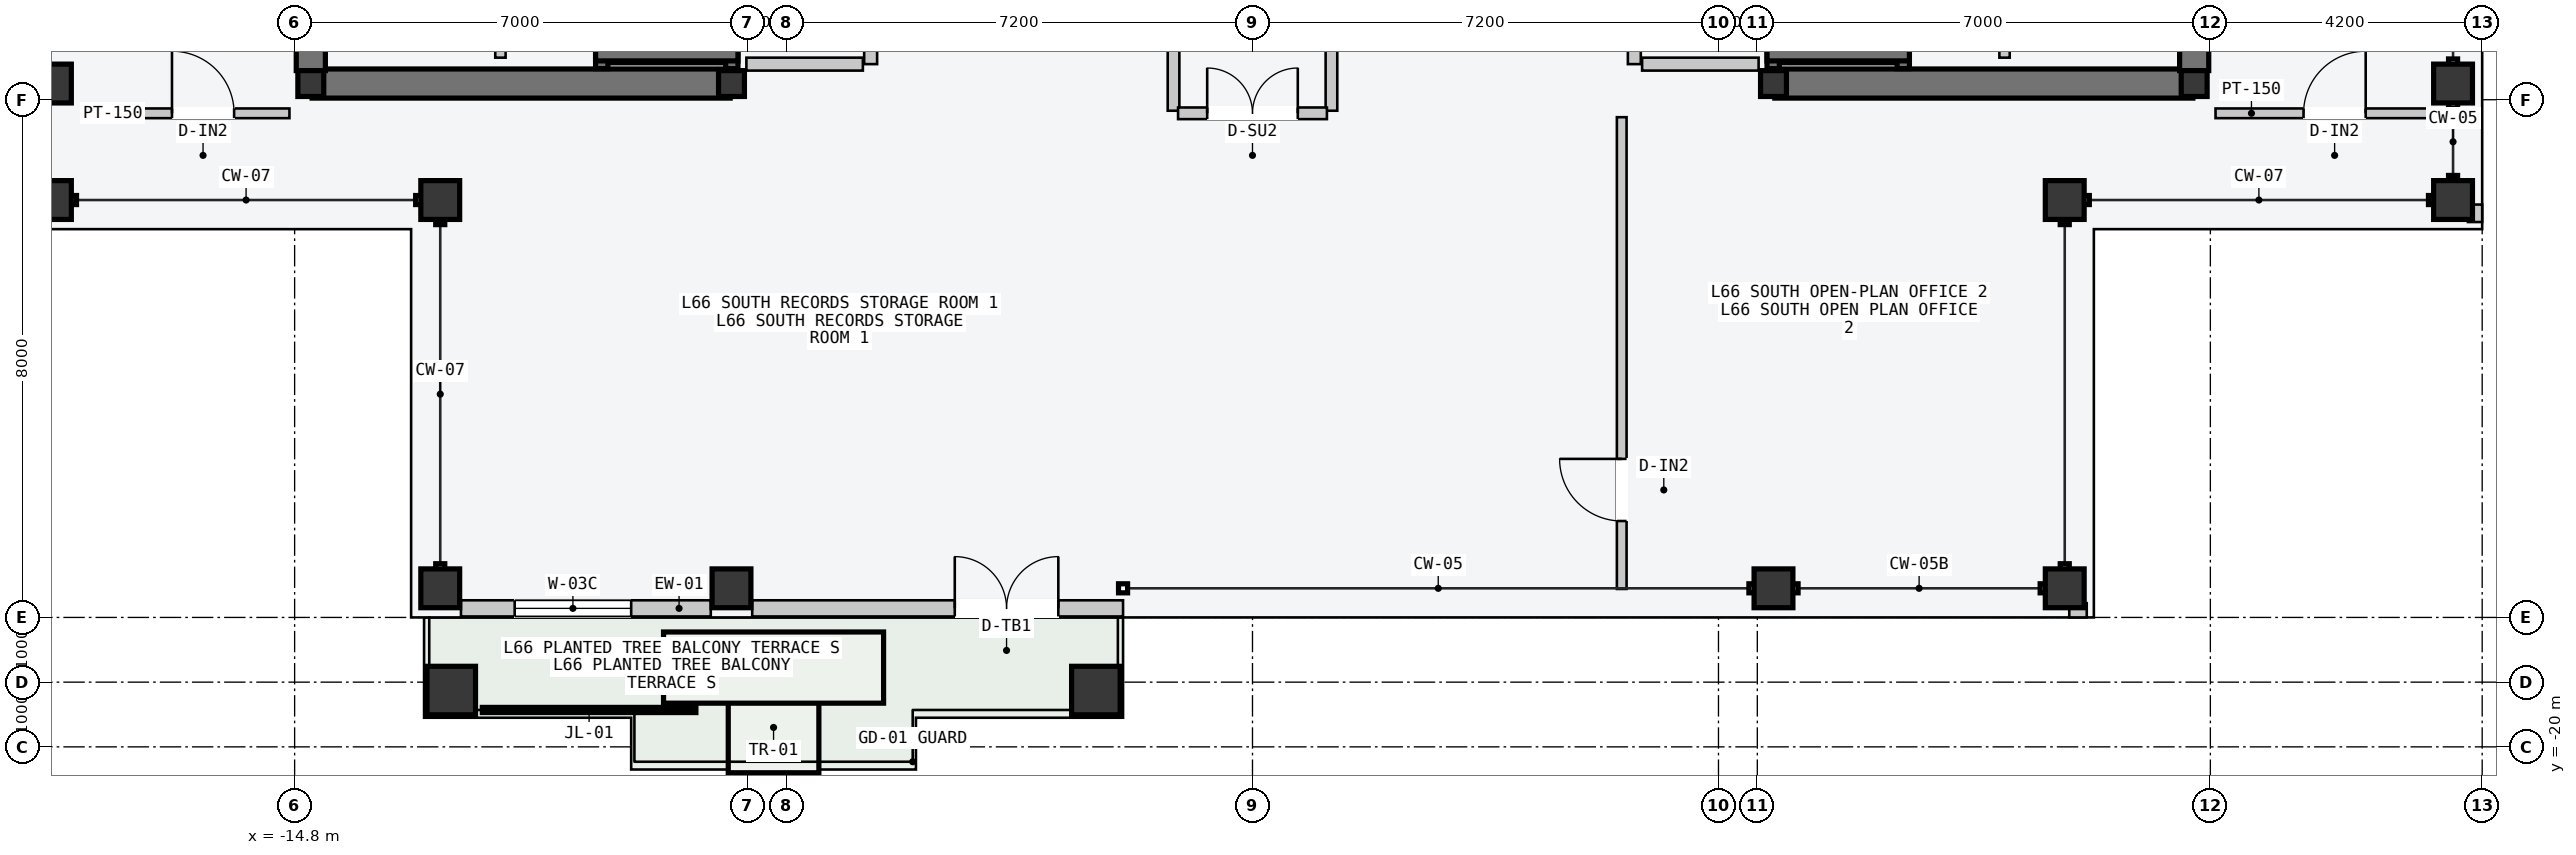
"""IFC4 building model, lengths in metres.
Left out: names, types, materials, properties, quantities, classifications, styles, units other than length and angle.
Written with IfcOpenShell. Run it as: python <this file> out.ifc"""

import sys

from ifc_helpers import new_model, si_unit, direction, frame, frame_2d, origin, origin_2d, place, context, subcontext, project, spatial, rectangle, hollow_rectangle, i_section, extrude, element, fill, save


model = new_model("IFC4")
c1 = context("Model", 3, precision=1e-05, world=origin(), true_north=direction((0.0, 1.0)))
c2 = subcontext(c1, "Body", "Model", "MODEL_VIEW")
j1 = project(units=[si_unit("LENGTHUNIT", "METRE"), si_unit("PLANEANGLEUNIT", "RADIAN")], contexts=[c1])
p1 = place(None, origin())
s1 = spatial("IfcSite", under=j1, at=p1, CompositionType="ELEMENT")
p2 = place(p1, origin())
s2 = spatial("IfcBuilding", under=s1, at=p2, CompositionType="ELEMENT")
p3 = place(p2, frame((0.0, 0.0, 250.8)))
s3 = spatial("IfcBuildingStorey", under=s2, at=p3, CompositionType="ELEMENT", Elevation=250.8)
p4 = place(p3, frame((-14.53, -9.75, -0.2), z_axis=(0.0, 0.0, 1.0), x_axis=(1.0, 0.0, 0.0)))
e1 = element("IfcWall", 1, at=p4, inside=s3, PredefinedType="SHEAR", context=c2, shape_type="SweptSolid", body=[
    extrude(rectangle(XDim=6.46, YDim=0.45, at=frame_2d((3.23, 0.0))), origin(), (0.0, 0.0, 1.0), 3.6),
])
p5 = place(p3, frame((-14.55, -9.55, -0.2), z_axis=(0.0, 0.0, 1.0), x_axis=(0.0, 1.0, 0.0)))
e2 = element("IfcWall", 2, at=p5, inside=s3, PredefinedType="SHEAR", context=c2, shape_type="SweptSolid", body=[
    extrude(rectangle(XDim=9.35, YDim=0.45, at=frame_2d((4.675, 0.0))), origin(), (0.0, 0.0, 1.0), 3.6),
])
p6 = place(p3, frame((8.07, -9.75, -0.2), z_axis=(0.0, 0.0, 1.0), x_axis=(1.0, 0.0, 0.0)))
e3 = element("IfcWall", 3, at=p6, inside=s3, PredefinedType="SHEAR", context=c2, shape_type="SweptSolid", body=[
    extrude(rectangle(XDim=6.46, YDim=0.45, at=frame_2d((3.23, 0.0))), origin(), (0.0, 0.0, 1.0), 3.6),
])
p7 = place(p3, frame((14.55, -9.55, -0.2), z_axis=(0.0, 0.0, 1.0), x_axis=(0.0, 1.0, 0.0)))
e4 = element("IfcWall", 4, at=p7, inside=s3, PredefinedType="SHEAR", context=c2, shape_type="SweptSolid", body=[
    extrude(rectangle(XDim=9.35, YDim=0.45, at=frame_2d((4.675, 0.0))), origin(), (0.0, 0.0, 1.0), 3.6),
])
for number, where, z_axis, x_axis in (
    (5, (-14.55, -9.75, 0.0), (0.0, 0.0, 1.0), (1.0, 0.0, 0.0)),
    (6, (-8.05, -9.75, 0.0), (0.0, 0.0, 1.0), (1.0, 0.0, 0.0)),
    (7, (8.05, -9.75, 0.0), (0.0, 0.0, 1.0), (1.0, 0.0, 0.0)),
    (8, (14.55, -9.75, 0.0), (0.0, 0.0, 1.0), (1.0, 0.0, 0.0)),
):
    element("IfcColumn", number, at=place(p3, frame(where, z_axis=z_axis, x_axis=x_axis)), inside=s3, PredefinedType="COLUMN", context=c2, shape_type="SweptSolid", body=[
        extrude(i_section(OverallWidth=0.4, OverallDepth=0.4, WebThickness=0.013, FlangeThickness=0.021, at=origin_2d()), origin(), (0.0, 0.0, 1.0), 3.6),
    ])
for number, where, z_axis, x_axis in (
    (9, (-12.55, -17.55, 0.0), (0.0, 0.0, 1.0), (1.0, 0.0, 0.0)),
    (10, (-8.05, -17.55, 0.0), (0.0, 0.0, 1.0), (1.0, 0.0, 0.0)),
    (11, (8.05, -17.55, 0.0), (0.0, 0.0, 1.0), (1.0, 0.0, 0.0)),
    (12, (12.55, -17.55, 0.0), (0.0, 0.0, 1.0), (1.0, 0.0, 0.0)),
    (13, (-18.55, -11.55, 0.0), (0.0, 0.0, 1.0), (0.0, 1.0, 0.0)),
    (14, (-18.55, -9.75, 0.0), (0.0, 0.0, 1.0), (0.0, 1.0, 0.0)),
    (15, (18.55, -11.55, 0.0), (0.0, 0.0, 1.0), (0.0, 1.0, 0.0)),
    (16, (18.55, -9.75, 0.0), (0.0, 0.0, 1.0), (0.0, 1.0, 0.0)),
    (17, (12.55, -11.55, 0.0), (0.0, 0.0, 1.0), (1.0, 0.0, 0.0)),
    (18, (-12.55, -11.55, 0.0), (0.0, 0.0, 1.0), (1.0, 0.0, 0.0)),
):
    element("IfcColumn", number, at=place(p3, frame(where, z_axis=z_axis, x_axis=x_axis)), inside=s3, PredefinedType="COLUMN", context=c2, shape_type="SweptSolid", body=[
        extrude(hollow_rectangle(XDim=0.6, YDim=0.6, WallThickness=0.025, at=origin_2d()), origin(), (0.0, 0.0, 1.0), 3.6),
    ])
for number, where, z_axis, x_axis in (
    (19, (-12.38, -19.13, 0.0), (0.0, 0.0, 1.0), (1.0, 0.0, 0.0)),
    (20, (-2.42, -19.13, 0.0), (0.0, 0.0, 1.0), (1.0, 0.0, 0.0)),
):
    element("IfcColumn", number, at=place(p3, frame(where, z_axis=z_axis, x_axis=x_axis)), inside=s3, PredefinedType="COLUMN", context=c2, shape_type="SweptSolid", body=[
        extrude(hollow_rectangle(XDim=0.75, YDim=0.75, WallThickness=0.032, at=origin_2d()), origin(), (0.0, 0.0, 1.0), 3.6),
    ])
p8 = place(p3, frame((-12.23, -17.86, 0.0), z_axis=(0.0, 0.0, 1.0), x_axis=(1.0, 0.0, 0.0)))
e21 = element("IfcWall", 21, at=p8, inside=s3, PredefinedType="STANDARD", context=c2, shape_type="SweptSolid", body=[
    extrude(rectangle(XDim=3.86, YDim=0.25, at=frame_2d((1.93, 0.0))), origin(), (0.0, 0.0, 1.0), 3.4),
])
p9 = place(p8, frame((0.83, 0.0, 0.85)))
e22 = element("IfcOpeningElement", 22, at=p9, cuts=e21, PredefinedType="OPENING", context=c2, shape_type="SweptSolid", body=[
    extrude(rectangle(XDim=1.8, YDim=2.05, at=frame_2d((0.9, 1.025))), frame((0.0, 0.135, 0.0), z_axis=(0.0, -1.0, 0.0), x_axis=(1.0, 0.0, 0.0)), (0.0, 0.0, 1.0), 0.27),
])
p10 = place(p3, frame((-7.73, -17.86, 0.0), z_axis=(0.0, 0.0, 1.0), x_axis=(1.0, 0.0, 0.0)))
e23 = element("IfcWall", 23, at=p10, inside=s3, PredefinedType="STANDARD", context=c2, shape_type="SweptSolid", body=[
    extrude(rectangle(XDim=5.73, YDim=0.25, at=frame_2d((2.865, 0.0))), origin(), (0.0, 0.0, 1.0), 3.4),
])
p11 = place(p10, frame((3.13, 0.0, 0.0)))
e24 = element("IfcOpeningElement", 24, at=p11, cuts=e23, PredefinedType="OPENING", context=c2, shape_type="SweptSolid", body=[
    extrude(rectangle(XDim=1.6, YDim=2.2, at=frame_2d((0.8, 1.1))), frame((0.0, 0.135, 0.0), z_axis=(0.0, -1.0, 0.0), x_axis=(1.0, 0.0, 0.0)), (0.0, 0.0, 1.0), 0.27),
])
for number, where, z_axis, x_axis in (
    (25, (12.62, -17.89, 0.0), (0.0, 0.0, 1.0), (1.0, 0.0, 0.0)),
    (26, (18.89, -11.89, 0.0), (0.0, 0.0, 1.0), (0.0, 1.0, 0.0)),
):
    element("IfcWall", number, at=place(p3, frame(where, z_axis=z_axis, x_axis=x_axis)), inside=s3, PredefinedType="PARAPET", context=c2, shape_type="SweptSolid", body=[
        extrude(rectangle(XDim=0.27, YDim=0.22, at=frame_2d((0.135, 0.0))), origin(), (0.0, 0.0, 1.0), 1.2),
    ])
p12 = place(p3, frame((-8.045, -9.52, -0.2), z_axis=(0.0, 0.0, 1.0), x_axis=(0.0, 1.0, 0.0)))
e27 = element("IfcWall", 27, at=p12, inside=s3, PredefinedType="SOLIDWALL", context=c2, shape_type="SweptSolid", body=[
    extrude(rectangle(XDim=2.12, YDim=0.19, at=frame_2d((1.06, 0.0))), origin(), (0.0, 0.0, 1.0), 3.6),
])
p13 = place(p12, frame((0.57, 0.0, 0.2)))
e28 = element("IfcOpeningElement", 28, at=p13, cuts=e27, PredefinedType="OPENING", context=c2, shape_type="SweptSolid", body=[
    extrude(rectangle(XDim=1.1, YDim=2.2, at=frame_2d((0.55, 1.1))), frame((0.0, 0.105, 0.0), z_axis=(0.0, -1.0, 0.0), x_axis=(1.0, 0.0, 0.0)), (0.0, 0.0, 1.0), 0.21),
])
p14 = place(p3, frame((-10.055, -9.52, -0.2), z_axis=(0.0, 0.0, 1.0), x_axis=(0.0, 1.0, 0.0)))
e29 = element("IfcWall", 29, at=p14, inside=s3, PredefinedType="SOLIDWALL", context=c2, shape_type="SweptSolid", body=[
    extrude(rectangle(XDim=2.12, YDim=0.19, at=frame_2d((1.06, 0.0))), origin(), (0.0, 0.0, 1.0), 3.6),
])
p15 = place(p3, frame((-10.15, -9.305, -0.2), z_axis=(0.0, 0.0, 1.0), x_axis=(1.0, 0.0, 0.0)))
e30 = element("IfcWall", 30, at=p15, inside=s3, PredefinedType="SOLIDWALL", context=c2, shape_type="SweptSolid", body=[
    extrude(rectangle(XDim=2.2, YDim=0.19, at=frame_2d((1.1, 0.0))), origin(), (0.0, 0.0, 1.0), 3.6),
])
p16 = place(p3, frame((8.045, -9.52, -0.2), z_axis=(0.0, 0.0, 1.0), x_axis=(0.0, 1.0, 0.0)))
e31 = element("IfcWall", 31, at=p16, inside=s3, PredefinedType="SOLIDWALL", context=c2, shape_type="SweptSolid", body=[
    extrude(rectangle(XDim=2.12, YDim=0.19, at=frame_2d((1.06, 0.0))), origin(), (0.0, 0.0, 1.0), 3.6),
])
p17 = place(p16, frame((0.57, 0.0, 0.2)))
e32 = element("IfcOpeningElement", 32, at=p17, cuts=e31, PredefinedType="OPENING", context=c2, shape_type="SweptSolid", body=[
    extrude(rectangle(XDim=1.1, YDim=2.2, at=frame_2d((0.55, 1.1))), frame((0.0, 0.105, 0.0), z_axis=(0.0, -1.0, 0.0), x_axis=(1.0, 0.0, 0.0)), (0.0, 0.0, 1.0), 0.21),
])
p18 = place(p3, frame((10.055, -9.52, -0.2), z_axis=(0.0, 0.0, 1.0), x_axis=(0.0, 1.0, 0.0)))
e33 = element("IfcWall", 33, at=p18, inside=s3, PredefinedType="SOLIDWALL", context=c2, shape_type="SweptSolid", body=[
    extrude(rectangle(XDim=2.12, YDim=0.19, at=frame_2d((1.06, 0.0))), origin(), (0.0, 0.0, 1.0), 3.6),
])
p19 = place(p3, frame((7.95, -9.305, -0.2), z_axis=(0.0, 0.0, 1.0), x_axis=(1.0, 0.0, 0.0)))
e34 = element("IfcWall", 34, at=p19, inside=s3, PredefinedType="SOLIDWALL", context=c2, shape_type="SweptSolid", body=[
    extrude(rectangle(XDim=2.2, YDim=0.19, at=frame_2d((1.1, 0.0))), origin(), (0.0, 0.0, 1.0), 3.6),
])
p20 = place(p3, frame((-5.9, -9.45, 0.0), z_axis=(0.0, 0.0, 1.0), x_axis=(0.0, 1.0, 0.0)))
e35 = element("IfcWall", 35, at=p20, inside=s3, PredefinedType="PARTITIONING", context=c2, shape_type="SweptSolid", body=[
    extrude(rectangle(XDim=10.5, YDim=0.2, at=frame_2d((5.25, 0.0))), origin(), (0.0, 0.0, 1.0), 3.4),
])
p21 = place(p20, frame((3.9, 0.0, 0.0)))
e36 = element("IfcOpeningElement", 36, at=p21, cuts=e35, PredefinedType="OPENING", context=c2, shape_type="SweptSolid", body=[
    extrude(rectangle(XDim=1.5, YDim=2.2, at=frame_2d((0.75, 1.1))), frame((0.0, 0.11, 0.0), z_axis=(0.0, -1.0, 0.0), x_axis=(1.0, 0.0, 0.0)), (0.0, 0.0, 1.0), 0.22),
])
p22 = place(p3, frame((-6.02, -9.45, 0.0), z_axis=(0.0, 0.0, 1.0), x_axis=(-1.0, 0.0, 0.0)))
e37 = element("IfcWall", 37, at=p22, inside=s3, PredefinedType="PARTITIONING", context=c2, shape_type="SweptSolid", body=[
    extrude(rectangle(XDim=1.8, YDim=0.2, at=frame_2d((0.9, 0.0))), origin(), (0.0, 0.0, 1.0), 3.4),
])
p23 = place(p3, frame((-11.62, -9.35, 0.0), z_axis=(0.0, 0.0, 1.0), x_axis=(0.0, 1.0, 0.0)))
e38 = element("IfcWall", 38, at=p23, inside=s3, PredefinedType="PARTITIONING", context=c2, shape_type="SweptSolid", body=[
    extrude(rectangle(XDim=3.85, YDim=0.16, at=frame_2d((1.925, 0.0))), origin(), (0.0, 0.0, 1.0), 3.4),
])
p24 = place(p23, frame((1.475, 0.0, 0.0)))
e39 = element("IfcOpeningElement", 39, at=p24, cuts=e38, PredefinedType="OPENING", context=c2, shape_type="SweptSolid", body=[
    extrude(rectangle(XDim=0.9, YDim=2.15, at=frame_2d((0.45, 1.075))), frame((0.0, 0.09, 0.0), z_axis=(0.0, -1.0, 0.0), x_axis=(1.0, 0.0, 0.0)), (0.0, 0.0, 1.0), 0.18),
])
p25 = place(p3, frame((5.9, -9.45, 0.0), z_axis=(0.0, 0.0, 1.0), x_axis=(0.0, 1.0, 0.0)))
e40 = element("IfcWall", 40, at=p25, inside=s3, PredefinedType="PARTITIONING", context=c2, shape_type="SweptSolid", body=[
    extrude(rectangle(XDim=10.5, YDim=0.2, at=frame_2d((5.25, 0.0))), origin(), (0.0, 0.0, 1.0), 3.4),
])
p26 = place(p25, frame((3.9, 0.0, 0.0)))
e41 = element("IfcOpeningElement", 41, at=p26, cuts=e40, PredefinedType="OPENING", context=c2, shape_type="SweptSolid", body=[
    extrude(rectangle(XDim=1.5, YDim=2.2, at=frame_2d((0.75, 1.1))), frame((0.0, 0.11, 0.0), z_axis=(0.0, -1.0, 0.0), x_axis=(1.0, 0.0, 0.0)), (0.0, 0.0, 1.0), 0.22),
])
p27 = place(p3, frame((6.02, -9.45, 0.0), z_axis=(0.0, 0.0, 1.0), x_axis=(1.0, 0.0, 0.0)))
e42 = element("IfcWall", 42, at=p27, inside=s3, PredefinedType="PARTITIONING", context=c2, shape_type="SweptSolid", body=[
    extrude(rectangle(XDim=1.8, YDim=0.2, at=frame_2d((0.9, 0.0))), origin(), (0.0, 0.0, 1.0), 3.4),
])
p28 = place(p3, frame((11.62, -9.35, 0.0), z_axis=(0.0, 0.0, 1.0), x_axis=(0.0, 1.0, 0.0)))
e43 = element("IfcWall", 43, at=p28, inside=s3, PredefinedType="PARTITIONING", context=c2, shape_type="SweptSolid", body=[
    extrude(rectangle(XDim=3.85, YDim=0.16, at=frame_2d((1.925, 0.0))), origin(), (0.0, 0.0, 1.0), 3.4),
])
p29 = place(p28, frame((1.475, 0.0, 0.0)))
e44 = element("IfcOpeningElement", 44, at=p29, cuts=e43, PredefinedType="OPENING", context=c2, shape_type="SweptSolid", body=[
    extrude(rectangle(XDim=0.9, YDim=2.15, at=frame_2d((0.45, 1.075))), frame((0.0, 0.09, 0.0), z_axis=(0.0, -1.0, 0.0), x_axis=(1.0, 0.0, 0.0)), (0.0, 0.0, 1.0), 0.18),
])
p30 = place(p3, frame((-1.22, -10.17, 0.0), z_axis=(0.0, 0.0, 1.0), x_axis=(0.0, 1.0, 0.0)))
e45 = element("IfcWall", 45, at=p30, inside=s3, PredefinedType="PARTITIONING", context=c2, shape_type="SweptSolid", body=[
    extrude(rectangle(XDim=4.49, YDim=0.18, at=frame_2d((2.245, 0.0))), origin(), (0.0, 0.0, 1.0), 3.4),
])
p31 = place(p30, frame((1.15, 0.0, 0.0)))
e46 = element("IfcOpeningElement", 46, at=p31, cuts=e45, PredefinedType="OPENING", context=c2, shape_type="SweptSolid", body=[
    extrude(rectangle(XDim=0.96, YDim=2.18, at=frame_2d((0.48, 1.09))), frame((0.0, 0.1, 0.0), z_axis=(0.0, -1.0, 0.0), x_axis=(1.0, 0.0, 0.0)), (0.0, 0.0, 1.0), 0.2),
])
p32 = place(p3, frame((1.22, -10.17, 0.0), z_axis=(0.0, 0.0, 1.0), x_axis=(0.0, 1.0, 0.0)))
e47 = element("IfcWall", 47, at=p32, inside=s3, PredefinedType="PARTITIONING", context=c2, shape_type="SweptSolid", body=[
    extrude(rectangle(XDim=4.49, YDim=0.18, at=frame_2d((2.245, 0.0))), origin(), (0.0, 0.0, 1.0), 3.4),
])
p33 = place(p32, frame((1.15, 0.0, 0.0)))
e48 = element("IfcOpeningElement", 48, at=p33, cuts=e47, PredefinedType="OPENING", context=c2, shape_type="SweptSolid", body=[
    extrude(rectangle(XDim=0.96, YDim=2.18, at=frame_2d((0.48, 1.09))), frame((0.0, 0.1, 0.0), z_axis=(0.0, -1.0, 0.0), x_axis=(1.0, 0.0, 0.0)), (0.0, 0.0, 1.0), 0.2),
])
p34 = place(p3, frame((5.705, -17.56, 0.0), z_axis=(0.0, 0.0, 1.0), x_axis=(0.0, 1.0, 0.0)))
e49 = element("IfcWall", 49, at=p34, inside=s3, PredefinedType="PARTITIONING", context=c2, shape_type="SweptSolid", body=[
    extrude(rectangle(XDim=7.29, YDim=0.15, at=frame_2d((3.645, 0.0))), origin(), (0.0, 0.0, 1.0), 3.4),
])
p35 = place(p34, frame((1.05, 0.0, 0.0)))
e50 = element("IfcOpeningElement", 50, at=p35, cuts=e49, PredefinedType="OPENING", context=c2, shape_type="SweptSolid", body=[
    extrude(rectangle(XDim=0.96, YDim=2.18, at=frame_2d((0.48, 1.09))), frame((0.0, 0.085, 0.0), z_axis=(0.0, -1.0, 0.0), x_axis=(1.0, 0.0, 0.0)), (0.0, 0.0, 1.0), 0.17),
])
p36 = place(p3, frame((-1.15, -10.21, 0.0), z_axis=(0.0, 0.0, 1.0), x_axis=(1.0, 0.0, 0.0)))
e51 = element("IfcWall", 51, at=p36, inside=s3, PredefinedType="PARTITIONING", context=c2, shape_type="SweptSolid", body=[
    extrude(rectangle(XDim=2.3, YDim=0.18, at=frame_2d((1.15, 0.0))), origin(), (0.0, 0.0, 1.0), 3.4),
])
p37 = place(p36, frame((0.45, 0.0, 0.0)))
e52 = element("IfcOpeningElement", 52, at=p37, cuts=e51, PredefinedType="OPENING", context=c2, shape_type="SweptSolid", body=[
    extrude(rectangle(XDim=1.4, YDim=2.2, at=frame_2d((0.7, 1.1))), frame((0.0, 0.1, 0.0), z_axis=(0.0, -1.0, 0.0), x_axis=(1.0, 0.0, 0.0)), (0.0, 0.0, 1.0), 0.2),
])
p38 = place(p3, frame((-17.55, -10.21, 0.0), z_axis=(0.0, 0.0, 1.0), x_axis=(1.0, 0.0, 0.0)))
e53 = element("IfcWall", 53, at=p38, inside=s3, PredefinedType="PARTITIONING", context=c2, shape_type="SweptSolid", body=[
    extrude(rectangle(XDim=2.67, YDim=0.15, at=frame_2d((1.335, 0.0))), origin(), (0.0, 0.0, 1.0), 3.4),
])
p39 = place(p38, frame((0.855, 0.0, 0.0)))
e54 = element("IfcOpeningElement", 54, at=p39, cuts=e53, PredefinedType="OPENING", context=c2, shape_type="SweptSolid", body=[
    extrude(rectangle(XDim=0.96, YDim=2.18, at=frame_2d((0.48, 1.09))), frame((0.0, 0.085, 0.0), z_axis=(0.0, -1.0, 0.0), x_axis=(1.0, 0.0, 0.0)), (0.0, 0.0, 1.0), 0.17),
])
p40 = place(p3, frame((14.88, -10.21, 0.0), z_axis=(0.0, 0.0, 1.0), x_axis=(1.0, 0.0, 0.0)))
e55 = element("IfcWall", 55, at=p40, inside=s3, PredefinedType="PARTITIONING", context=c2, shape_type="SweptSolid", body=[
    extrude(rectangle(XDim=3.68, YDim=0.15, at=frame_2d((1.84, 0.0))), origin(), (0.0, 0.0, 1.0), 3.4),
])
p41 = place(p40, frame((1.36, 0.0, 0.0)))
e56 = element("IfcOpeningElement", 56, at=p41, cuts=e55, PredefinedType="OPENING", context=c2, shape_type="SweptSolid", body=[
    extrude(rectangle(XDim=0.96, YDim=2.18, at=frame_2d((0.48, 1.09))), frame((0.0, 0.085, 0.0), z_axis=(0.0, -1.0, 0.0), x_axis=(1.0, 0.0, 0.0)), (0.0, 0.0, 1.0), 0.17),
])
p42 = place(p9, origin())
e57 = element("IfcWindow", 57, at=p42, inside=s3, PartitioningType="SINGLE_PANEL", PredefinedType="WINDOW", context=c2, shape_type="SweptSolid", body=[
    extrude(rectangle(XDim=1.8, YDim=2.05, at=frame_2d((0.9, 1.025))), frame((0.0, 0.03, 0.0), z_axis=(0.0, -1.0, 0.0), x_axis=(1.0, 0.0, 0.0)), (0.0, 0.0, 1.0), 0.06),
])
fill(e22, e57)
p43 = place(p11, origin())
e58 = element("IfcDoor", 58, at=p43, inside=s3, OperationType="DOUBLE_DOOR_SINGLE_SWING", PredefinedType="DOOR", context=c2, shape_type="SweptSolid", body=[
    extrude(rectangle(XDim=1.6, YDim=2.2, at=frame_2d((0.8, 1.1))), frame((0.0, 0.025, 0.0), z_axis=(0.0, -1.0, 0.0), x_axis=(1.0, 0.0, 0.0)), (0.0, 0.0, 1.0), 0.05),
])
fill(e24, e58)
p44 = place(p35, origin())
e59 = element("IfcDoor", 59, at=p44, inside=s3, OperationType="SINGLE_SWING_RIGHT", PredefinedType="DOOR", context=c2, shape_type="SweptSolid", body=[
    extrude(rectangle(XDim=0.96, YDim=2.18, at=frame_2d((0.48, 1.09))), frame((0.0, 0.025, 0.0), z_axis=(0.0, -1.0, 0.0), x_axis=(1.0, 0.0, 0.0)), (0.0, 0.0, 1.0), 0.05),
])
fill(e50, e59)
p45 = place(p37, origin())
e60 = element("IfcDoor", 60, at=p45, inside=s3, OperationType="DOUBLE_DOOR_SINGLE_SWING", PredefinedType="DOOR", context=c2, shape_type="SweptSolid", body=[
    extrude(rectangle(XDim=1.4, YDim=2.2, at=frame_2d((0.7, 1.1))), frame((0.0, 0.025, 0.0), z_axis=(0.0, -1.0, 0.0), x_axis=(1.0, 0.0, 0.0)), (0.0, 0.0, 1.0), 0.05),
])
fill(e52, e60)
p46 = place(p39, origin())
e61 = element("IfcDoor", 61, at=p46, inside=s3, OperationType="SINGLE_SWING_LEFT", PredefinedType="DOOR", context=c2, shape_type="SweptSolid", body=[
    extrude(rectangle(XDim=0.96, YDim=2.18, at=frame_2d((0.48, 1.09))), frame((0.0, 0.025, 0.0), z_axis=(0.0, -1.0, 0.0), x_axis=(1.0, 0.0, 0.0)), (0.0, 0.0, 1.0), 0.05),
])
fill(e54, e61)
p47 = place(p41, origin())
e62 = element("IfcDoor", 62, at=p47, inside=s3, OperationType="SINGLE_SWING_RIGHT", PredefinedType="DOOR", context=c2, shape_type="SweptSolid", body=[
    extrude(rectangle(XDim=0.96, YDim=2.18, at=frame_2d((0.48, 1.09))), frame((0.0, 0.025, 0.0), z_axis=(0.0, -1.0, 0.0), x_axis=(1.0, 0.0, 0.0)), (0.0, 0.0, 1.0), 0.05),
])
fill(e56, e62)
save(model, sys.argv[1])
